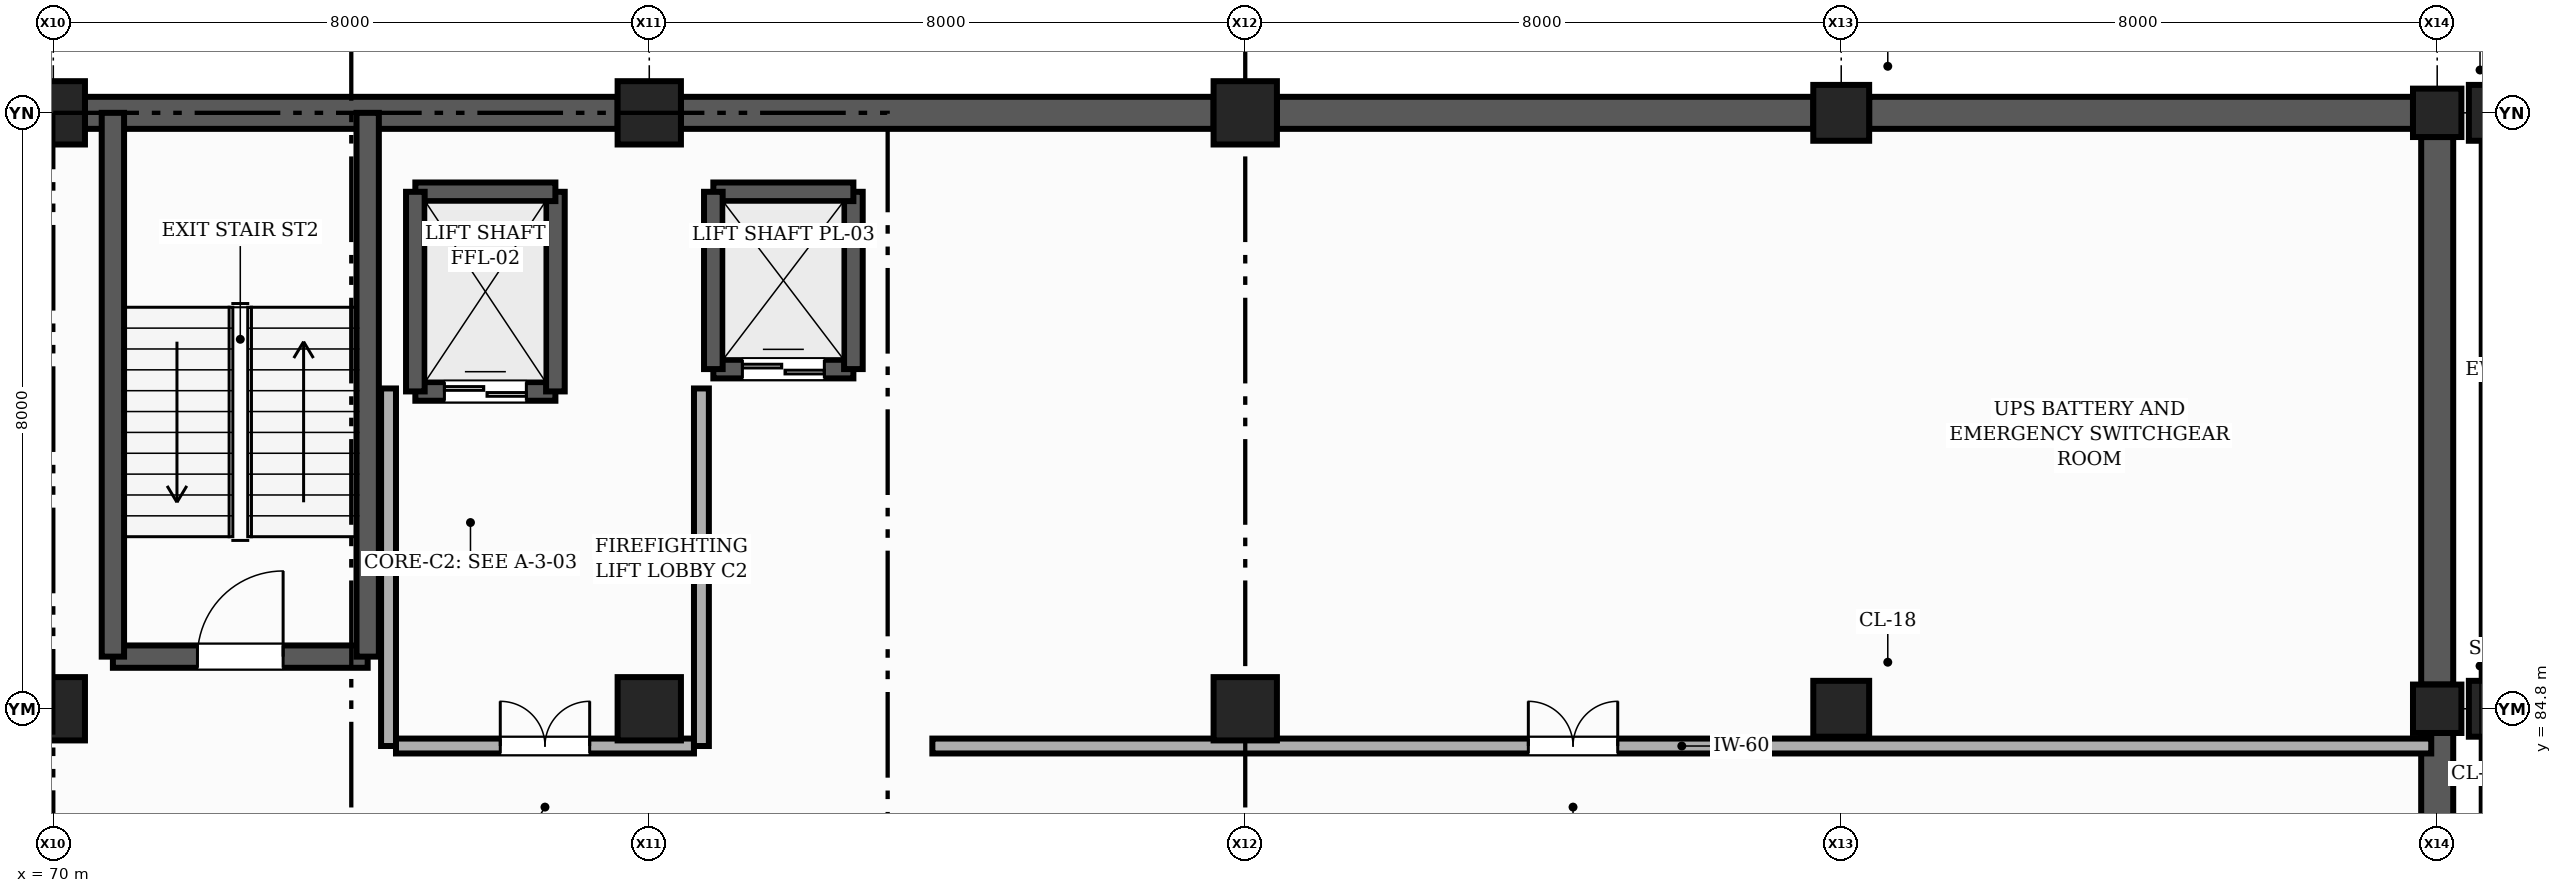
"""IFC4 building model, lengths in metres.
Left out: names, types, materials, properties, quantities, classifications, styles, units other than length and angle.
Written with IfcOpenShell. Run it as: python <this file> out.ifc"""

import sys

from ifc_helpers import new_model, si_unit, direction, frame, frame_2d, origin, origin_2d, place, context, subcontext, project, spatial, rectangle, extrude, element, fill, save


model = new_model("IFC4")
c1 = context("Model", 3, precision=1e-05, world=origin(), true_north=direction((0.0, 1.0)))
c2 = subcontext(c1, "Body", "Model", "MODEL_VIEW")
j1 = project(units=[si_unit("LENGTHUNIT", "METRE"), si_unit("PLANEANGLEUNIT", "RADIAN")], contexts=[c1])
p1 = place(None, origin())
s1 = spatial("IfcSite", under=j1, at=p1, CompositionType="ELEMENT")
p2 = place(p1, origin())
s2 = spatial("IfcBuilding", under=s1, at=p2, CompositionType="ELEMENT")
p3 = place(p2, frame((0.0, 0.0, -4.2)))
s3 = spatial("IfcBuildingStorey", under=s2, at=p3, CompositionType="ELEMENT", Elevation=-4.2)
for number, where, z_axis, x_axis in (
    (1, (70.0, 84.8, -0.52), (0.0, 0.0, 1.0), (1.0, 0.0, 0.0)),
    (2, (70.0, 92.8, -0.52), (0.0, 0.0, 1.0), (1.0, 0.0, 0.0)),
    (3, (78.0, 84.8, -0.52), (0.0, 0.0, 1.0), (1.0, 0.0, 0.0)),
    (4, (78.0, 92.8, -0.52), (0.0, 0.0, 1.0), (1.0, 0.0, 0.0)),
    (5, (86.0, 84.8, -0.52), (0.0, 0.0, 1.0), (1.0, 0.0, 0.0)),
    (6, (86.0, 92.8, -0.52), (0.0, 0.0, 1.0), (1.0, 0.0, 0.0)),
):
    element("IfcColumn", number, at=place(p3, frame(where, z_axis=z_axis, x_axis=x_axis)), inside=s3, PredefinedType="COLUMN", context=c2, shape_type="SweptSolid", body=[
        extrude(rectangle(XDim=0.85, YDim=0.85, at=origin_2d()), origin(), (0.0, 0.0, 1.0), 4.72),
    ])
for number, where, z_axis, x_axis in (
    (7, (94.0, 84.8, -0.52), (0.0, 0.0, 1.0), (1.0, 0.0, 0.0)),
    (8, (94.0, 92.8, -0.52), (0.0, 0.0, 1.0), (1.0, 0.0, 0.0)),
):
    element("IfcColumn", number, at=place(p3, frame(where, z_axis=z_axis, x_axis=x_axis)), inside=s3, PredefinedType="COLUMN", context=c2, shape_type="SweptSolid", body=[
        extrude(rectangle(XDim=0.75, YDim=0.75, at=origin_2d()), origin(), (0.0, 0.0, 1.0), 4.72),
    ])
for number, where, z_axis, x_axis in (
    (9, (102.0, 84.8, -0.52), (0.0, 0.0, 1.0), (1.0, 0.0, 0.0)),
    (10, (102.0, 92.8, -0.52), (0.0, 0.0, 1.0), (1.0, 0.0, 0.0)),
):
    element("IfcColumn", number, at=place(p3, frame(where, z_axis=z_axis, x_axis=x_axis)), inside=s3, PredefinedType="COLUMN", context=c2, shape_type="SweptSolid", body=[
        extrude(rectangle(XDim=0.65, YDim=0.65, at=origin_2d()), origin(), (0.0, 0.0, 1.0), 4.72),
    ])
for number, where, z_axis, x_axis in (
    (11, (102.8, 84.8, -0.52), (0.0, 0.0, 1.0), (1.0, 0.0, 0.0)),
    (12, (102.8, 92.8, -0.52), (0.0, 0.0, 1.0), (1.0, 0.0, 0.0)),
):
    element("IfcColumn", number, at=place(p3, frame(where, z_axis=z_axis, x_axis=x_axis)), inside=s3, PredefinedType="COLUMN", context=c2, shape_type="SweptSolid", body=[
        extrude(rectangle(XDim=0.75, YDim=0.75, at=origin_2d()), origin(), (0.0, 0.0, 1.0), 4.72),
    ])
for number, where, z_axis, x_axis in (
    (13, (102.0, 77.125, -0.44), (0.0, 0.0, 1.0), (0.0, 1.0, 0.0)),
    (14, (102.0, 85.125, -0.44), (0.0, 0.0, 1.0), (0.0, 1.0, 0.0)),
):
    element("IfcWall", number, at=place(p3, frame(where, z_axis=z_axis, x_axis=x_axis)), inside=s3, PredefinedType="SOLIDWALL", context=c2, shape_type="SweptSolid", body=[
        extrude(rectangle(XDim=7.35, YDim=0.43, at=frame_2d((3.675, 0.0))), origin(), (0.0, 0.0, 1.0), 3.57),
    ])
p4 = place(p3, frame((101.675, 92.8, -0.44), z_axis=(0.0, 0.0, 1.0), x_axis=(-1.0, 0.0, 0.0)))
e15 = element("IfcWall", 15, at=p4, inside=s3, PredefinedType="SOLIDWALL", context=c2, shape_type="SweptSolid", body=[
    extrude(rectangle(XDim=7.3, YDim=0.43, at=frame_2d((3.65, 0.0))), origin(), (0.0, 0.0, 1.0), 3.47),
])
p5 = place(p3, frame((93.625, 92.8, -0.44), z_axis=(0.0, 0.0, 1.0), x_axis=(-1.0, 0.0, 0.0)))
e16 = element("IfcWall", 16, at=p5, inside=s3, PredefinedType="SOLIDWALL", context=c2, shape_type="SweptSolid", body=[
    extrude(rectangle(XDim=7.2, YDim=0.43, at=frame_2d((3.6, 0.0))), origin(), (0.0, 0.0, 1.0), 3.47),
])
p6 = place(p3, frame((85.575, 92.8, -0.44), z_axis=(0.0, 0.0, 1.0), x_axis=(-1.0, 0.0, 0.0)))
e17 = element("IfcWall", 17, at=p6, inside=s3, PredefinedType="SOLIDWALL", context=c2, shape_type="SweptSolid", body=[
    extrude(rectangle(XDim=7.15, YDim=0.43, at=frame_2d((3.575, 0.0))), origin(), (0.0, 0.0, 1.0), 3.47),
])
p7 = place(p3, frame((77.575, 92.8, -0.44), z_axis=(0.0, 0.0, 1.0), x_axis=(-1.0, 0.0, 0.0)))
e18 = element("IfcWall", 18, at=p7, inside=s3, PredefinedType="SOLIDWALL", context=c2, shape_type="SweptSolid", body=[
    extrude(rectangle(XDim=7.15, YDim=0.43, at=frame_2d((3.575, 0.0))), origin(), (0.0, 0.0, 1.0), 4.22),
])
for number, where, z_axis, x_axis in (
    (19, (102.8, 92.425, -0.44), (0.0, 0.0, 1.0), (0.0, -1.0, 0.0)),
    (20, (102.8, 84.425, -0.44), (0.0, 0.0, 1.0), (0.0, -1.0, 0.0)),
):
    element("IfcWall", number, at=place(p3, frame(where, z_axis=z_axis, x_axis=x_axis)), inside=s3, PredefinedType="SOLIDWALL", context=c2, shape_type="SweptSolid", body=[
        extrude(rectangle(XDim=7.25, YDim=0.405, at=frame_2d((3.625, 0.0))), origin(), (0.0, 0.0, 1.0), 3.57),
    ])
p8 = place(p3, frame((70.8, 85.5, -0.52), z_axis=(0.0, 0.0, 1.0), x_axis=(1.0, 0.0, 0.0)))
e21 = element("IfcWall", 21, at=p8, inside=s3, PredefinedType="SHEAR", context=c2, shape_type="SweptSolid", body=[
    extrude(rectangle(XDim=3.42, YDim=0.3, at=frame_2d((1.71, 0.0))), origin(), (0.0, 0.0, 1.0), 4.72),
])
p9 = place(p8, frame((1.135, 0.0, 0.52)))
e22 = element("IfcOpeningElement", 22, at=p9, cuts=e21, PredefinedType="OPENING", context=c2, shape_type="SweptSolid", body=[
    extrude(rectangle(XDim=1.15, YDim=2.15, at=frame_2d((0.575, 1.075))), frame((0.0, 0.16, 0.0), z_axis=(0.0, -1.0, 0.0), x_axis=(1.0, 0.0, 0.0)), (0.0, 0.0, 1.0), 0.32),
])
for number, where, z_axis, x_axis in (
    (23, (74.22, 85.5, -0.52), (0.0, 0.0, 1.0), (0.0, 1.0, 0.0)),
    (24, (70.8, 92.8, -0.52), (0.0, 0.0, 1.0), (0.0, -1.0, 0.0)),
):
    element("IfcWall", number, at=place(p3, frame(where, z_axis=z_axis, x_axis=x_axis)), inside=s3, PredefinedType="SHEAR", context=c2, shape_type="SweptSolid", body=[
        extrude(rectangle(XDim=7.3, YDim=0.3, at=frame_2d((3.65, 0.0))), origin(), (0.0, 0.0, 1.0), 4.72),
    ])
p10 = place(p3, frame((74.86, 89.06, -0.5), z_axis=(0.0, 0.0, 1.0), x_axis=(1.0, 0.0, 0.0)))
e25 = element("IfcWall", 25, at=p10, inside=s3, PredefinedType="SHEAR", context=c2, shape_type="SweptSolid", body=[
    extrude(rectangle(XDim=1.88, YDim=0.25, at=frame_2d((0.94, 0.0))), origin(), (0.0, 0.0, 1.0), 4.7),
])
p11 = place(p10, frame((0.39, 0.0, 0.5)))
e26 = element("IfcOpeningElement", 26, at=p11, cuts=e25, PredefinedType="OPENING", context=c2, shape_type="SweptSolid", body=[
    extrude(rectangle(XDim=1.1, YDim=2.2, at=frame_2d((0.55, 1.1))), frame((0.0, 0.135, 0.0), z_axis=(0.0, -1.0, 0.0), x_axis=(1.0, 0.0, 0.0)), (0.0, 0.0, 1.0), 0.27),
])
p12 = place(p3, frame((76.74, 89.06, -0.5), z_axis=(0.0, 0.0, 1.0), x_axis=(0.0, 1.0, 0.0)))
e27 = element("IfcWall", 27, at=p12, inside=s3, PredefinedType="SHEAR", context=c2, shape_type="SweptSolid", body=[
    extrude(rectangle(XDim=2.68, YDim=0.25, at=frame_2d((1.34, 0.0))), origin(), (0.0, 0.0, 1.0), 4.7),
])
p13 = place(p3, frame((76.74, 91.74, -0.5), z_axis=(0.0, 0.0, 1.0), x_axis=(-1.0, 0.0, 0.0)))
e28 = element("IfcWall", 28, at=p13, inside=s3, PredefinedType="SHEAR", context=c2, shape_type="SweptSolid", body=[
    extrude(rectangle(XDim=1.88, YDim=0.25, at=frame_2d((0.94, 0.0))), origin(), (0.0, 0.0, 1.0), 4.7),
])
p14 = place(p3, frame((74.86, 91.74, -0.5), z_axis=(0.0, 0.0, 1.0), x_axis=(0.0, -1.0, 0.0)))
e29 = element("IfcWall", 29, at=p14, inside=s3, PredefinedType="SHEAR", context=c2, shape_type="SweptSolid", body=[
    extrude(rectangle(XDim=2.68, YDim=0.25, at=frame_2d((1.34, 0.0))), origin(), (0.0, 0.0, 1.0), 4.7),
])
p15 = place(p3, frame((78.86, 89.36, -0.5), z_axis=(0.0, 0.0, 1.0), x_axis=(1.0, 0.0, 0.0)))
e30 = element("IfcWall", 30, at=p15, inside=s3, PredefinedType="SHEAR", context=c2, shape_type="SweptSolid", body=[
    extrude(rectangle(XDim=1.88, YDim=0.25, at=frame_2d((0.94, 0.0))), origin(), (0.0, 0.0, 1.0), 4.7),
])
p16 = place(p15, frame((0.39, 0.0, 0.5)))
e31 = element("IfcOpeningElement", 31, at=p16, cuts=e30, PredefinedType="OPENING", context=c2, shape_type="SweptSolid", body=[
    extrude(rectangle(XDim=1.1, YDim=2.2, at=frame_2d((0.55, 1.1))), frame((0.0, 0.135, 0.0), z_axis=(0.0, -1.0, 0.0), x_axis=(1.0, 0.0, 0.0)), (0.0, 0.0, 1.0), 0.27),
])
p17 = place(p3, frame((80.74, 89.36, -0.5), z_axis=(0.0, 0.0, 1.0), x_axis=(0.0, 1.0, 0.0)))
e32 = element("IfcWall", 32, at=p17, inside=s3, PredefinedType="SHEAR", context=c2, shape_type="SweptSolid", body=[
    extrude(rectangle(XDim=2.38, YDim=0.25, at=frame_2d((1.19, 0.0))), origin(), (0.0, 0.0, 1.0), 4.7),
])
p18 = place(p3, frame((80.74, 91.74, -0.5), z_axis=(0.0, 0.0, 1.0), x_axis=(-1.0, 0.0, 0.0)))
e33 = element("IfcWall", 33, at=p18, inside=s3, PredefinedType="SHEAR", context=c2, shape_type="SweptSolid", body=[
    extrude(rectangle(XDim=1.88, YDim=0.25, at=frame_2d((0.94, 0.0))), origin(), (0.0, 0.0, 1.0), 4.7),
])
p19 = place(p3, frame((78.86, 91.74, -0.5), z_axis=(0.0, 0.0, 1.0), x_axis=(0.0, -1.0, 0.0)))
e34 = element("IfcWall", 34, at=p19, inside=s3, PredefinedType="SHEAR", context=c2, shape_type="SweptSolid", body=[
    extrude(rectangle(XDim=2.38, YDim=0.25, at=frame_2d((1.19, 0.0))), origin(), (0.0, 0.0, 1.0), 4.7),
])
p20 = place(p3, frame((74.6, 84.3, 0.0), z_axis=(0.0, 0.0, 1.0), x_axis=(1.0, 0.0, 0.0)))
e35 = element("IfcWall", 35, at=p20, inside=s3, PredefinedType="PARTITIONING", context=c2, shape_type="SweptSolid", body=[
    extrude(rectangle(XDim=4.0, YDim=0.2, at=frame_2d((2.0, 0.0))), origin(), (0.0, 0.0, 1.0), 2.915),
])
p21 = place(p20, frame((1.4, 0.0, 0.0)))
e36 = element("IfcOpeningElement", 36, at=p21, cuts=e35, PredefinedType="OPENING", context=c2, shape_type="SweptSolid", body=[
    extrude(rectangle(XDim=1.2, YDim=2.15, at=frame_2d((0.6, 1.075))), frame((0.0, 0.11, 0.0), z_axis=(0.0, -1.0, 0.0), x_axis=(1.0, 0.0, 0.0)), (0.0, 0.0, 1.0), 0.22),
])
p22 = place(p3, frame((74.5, 84.3, 0.0), z_axis=(0.0, 0.0, 1.0), x_axis=(0.0, 1.0, 0.0)))
e37 = element("IfcWall", 37, at=p22, inside=s3, PredefinedType="PARTITIONING", context=c2, shape_type="SweptSolid", body=[
    extrude(rectangle(XDim=4.8, YDim=0.2, at=frame_2d((2.4, 0.0))), origin(), (0.0, 0.0, 1.0), 3.115),
])
p23 = place(p3, frame((78.7, 84.3, 0.0), z_axis=(0.0, 0.0, 1.0), x_axis=(0.0, 1.0, 0.0)))
e38 = element("IfcWall", 38, at=p23, inside=s3, PredefinedType="PARTITIONING", context=c2, shape_type="SweptSolid", body=[
    extrude(rectangle(XDim=4.8, YDim=0.2, at=frame_2d((2.4, 0.0))), origin(), (0.0, 0.0, 1.0), 3.165),
])
p24 = place(p3, frame((81.8, 84.3, 0.0), z_axis=(0.0, 0.0, 1.0), x_axis=(1.0, 0.0, 0.0)))
e39 = element("IfcWall", 39, at=p24, inside=s3, PredefinedType="PARTITIONING", context=c2, shape_type="SweptSolid", body=[
    extrude(rectangle(XDim=20.12, YDim=0.2, at=frame_2d((10.06, 0.0))), origin(), (0.0, 0.0, 1.0), 2.915),
])
p25 = place(p24, frame((8.0, 0.0, 0.0)))
e40 = element("IfcOpeningElement", 40, at=p25, cuts=e39, PredefinedType="OPENING", context=c2, shape_type="SweptSolid", body=[
    extrude(rectangle(XDim=1.2, YDim=2.15, at=frame_2d((0.6, 1.075))), frame((0.0, 0.11, 0.0), z_axis=(0.0, -1.0, 0.0), x_axis=(1.0, 0.0, 0.0)), (0.0, 0.0, 1.0), 0.22),
])
p26 = place(p9, origin())
e41 = element("IfcDoor", 41, at=p26, inside=s3, OperationType="SINGLE_SWING_RIGHT", PredefinedType="DOOR", context=c2, shape_type="SweptSolid", body=[
    extrude(rectangle(XDim=1.15, YDim=2.15, at=frame_2d((0.575, 1.075))), frame((0.0, 0.025, 0.0), z_axis=(0.0, -1.0, 0.0), x_axis=(1.0, 0.0, 0.0)), (0.0, 0.0, 1.0), 0.05),
])
fill(e22, e41)
p27 = place(p11, origin())
e42 = element("IfcDoor", 42, at=p27, inside=s3, OperationType="DOUBLE_DOOR_SLIDING", PredefinedType="DOOR", context=c2, shape_type="SweptSolid", body=[
    extrude(rectangle(XDim=1.1, YDim=2.2, at=frame_2d((0.55, 1.1))), frame((0.0, 0.025, 0.0), z_axis=(0.0, -1.0, 0.0), x_axis=(1.0, 0.0, 0.0)), (0.0, 0.0, 1.0), 0.05),
])
fill(e26, e42)
p28 = place(p16, origin())
e43 = element("IfcDoor", 43, at=p28, inside=s3, OperationType="DOUBLE_DOOR_SLIDING", PredefinedType="DOOR", context=c2, shape_type="SweptSolid", body=[
    extrude(rectangle(XDim=1.1, YDim=2.2, at=frame_2d((0.55, 1.1))), frame((0.0, 0.025, 0.0), z_axis=(0.0, -1.0, 0.0), x_axis=(1.0, 0.0, 0.0)), (0.0, 0.0, 1.0), 0.05),
])
fill(e31, e43)
p29 = place(p21, origin())
e44 = element("IfcDoor", 44, at=p29, inside=s3, OperationType="DOUBLE_DOOR_SINGLE_SWING", PredefinedType="DOOR", context=c2, shape_type="SweptSolid", body=[
    extrude(rectangle(XDim=1.2, YDim=2.15, at=frame_2d((0.6, 1.075))), frame((0.0, 0.025, 0.0), z_axis=(0.0, -1.0, 0.0), x_axis=(1.0, 0.0, 0.0)), (0.0, 0.0, 1.0), 0.05),
])
fill(e36, e44)
p30 = place(p25, origin())
e45 = element("IfcDoor", 45, at=p30, inside=s3, OperationType="DOUBLE_DOOR_SINGLE_SWING", PredefinedType="DOOR", context=c2, shape_type="SweptSolid", body=[
    extrude(rectangle(XDim=1.2, YDim=2.15, at=frame_2d((0.6, 1.075))), frame((0.0, 0.025, 0.0), z_axis=(0.0, -1.0, 0.0), x_axis=(1.0, 0.0, 0.0)), (0.0, 0.0, 1.0), 0.05),
])
fill(e40, e45)
save(model, sys.argv[1])
